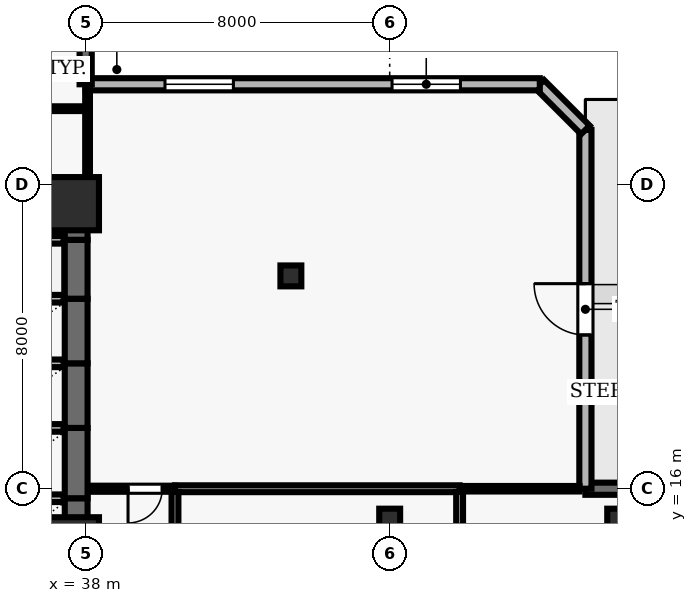
"""IFC4 building model, lengths in metres.
Left out: names, types, materials, properties, quantities, classifications, styles, units other than length and angle.
Written with IfcOpenShell. Run it as: python <this file> out.ifc"""

import sys

from ifc_helpers import new_model, si_unit, direction, frame, frame_2d, origin, origin_2d, place, context, subcontext, project, spatial, rectangle, hollow_rectangle, extrude, element, fill, save


model = new_model("IFC4")
c1 = context("Model", 3, precision=1e-05, world=origin(), true_north=direction((0.0, 1.0)))
c2 = subcontext(c1, "Body", "Model", "MODEL_VIEW")
j1 = project(units=[si_unit("LENGTHUNIT", "METRE"), si_unit("PLANEANGLEUNIT", "RADIAN")], contexts=[c1])
p1 = place(None, origin())
s1 = spatial("IfcSite", under=j1, at=p1, CompositionType="ELEMENT")
p2 = place(p1, origin())
s2 = spatial("IfcBuilding", under=s1, at=p2, CompositionType="ELEMENT")
p3 = place(p2, frame((0.0, 0.0, 62.2)))
s3 = spatial("IfcBuildingStorey", under=s2, at=p3, CompositionType="ELEMENT", Elevation=62.2)
for number, where, z_axis, x_axis in (
    (1, (37.65, 14.55, 0.0), (0.0, 0.0, 1.0), (1.0, 0.0, 0.0)),
    (2, (37.65, 23.5, 0.0), (0.0, 0.0, 1.0), (1.0, 0.0, 0.0)),
):
    element("IfcColumn", number, at=place(p3, frame(where, z_axis=z_axis, x_axis=x_axis)), inside=s3, PredefinedType="COLUMN", context=c2, shape_type="SweptSolid", body=[
        extrude(rectangle(XDim=1.4, YDim=1.4, at=origin_2d()), origin(), (0.0, 0.0, 1.0), 3.9),
    ])
for number, where, z_axis, x_axis in (
    (3, (46.0, 15.2, 0.0), (0.0, 0.0, 1.0), (1.0, 0.0, 0.0)),
    (4, (52.0, 15.2, 0.0), (0.0, 0.0, 1.0), (1.0, 0.0, 0.0)),
    (5, (43.4, 21.6, 0.0), (0.0, 0.0, 1.0), (1.0, 0.0, 0.0)),
):
    element("IfcColumn", number, at=place(p3, frame(where, z_axis=z_axis, x_axis=x_axis)), inside=s3, PredefinedType="COLUMN", context=c2, shape_type="SweptSolid", body=[
        extrude(hollow_rectangle(XDim=0.55, YDim=0.55, WallThickness=0.025, at=origin_2d()), origin(), (0.0, 0.0, 1.0), 3.9),
    ])
p4 = place(p3, frame((73.5, 16.0, 0.0), z_axis=(0.0, 0.0, 1.0), x_axis=(-1.0, 0.0, 0.0)))
e6 = element("IfcWall", 6, at=p4, inside=s3, PredefinedType="SOLIDWALL", context=c2, shape_type="SweptSolid", body=[
    extrude(rectangle(XDim=22.35, YDim=0.32, at=frame_2d((11.175, 0.0))), origin(), (0.0, 0.0, 1.0), 3.69),
])
p5 = place(p4, frame((12.05, 0.0, 0.0)))
e7 = element("IfcOpeningElement", 7, at=p5, cuts=e6, PredefinedType="OPENING", context=c2, shape_type="SweptSolid", body=[
    extrude(rectangle(XDim=1.0, YDim=2.2, at=frame_2d((0.5, 1.1))), frame((0.0, 0.17, 0.0), z_axis=(0.0, -1.0, 0.0), x_axis=(1.0, 0.0, 0.0)), (0.0, 0.0, 1.0), 0.34),
])
p6 = place(p4, frame((1.444, 0.0, 0.9)))
e8 = element("IfcOpeningElement", 8, at=p6, cuts=e6, PredefinedType="OPENING", context=c2, shape_type="SweptSolid", body=[
    extrude(rectangle(XDim=1.8, YDim=1.8, at=frame_2d((0.9, 0.9))), frame((0.0, 0.17, 0.0), z_axis=(0.0, -1.0, 0.0), x_axis=(1.0, 0.0, 0.0)), (0.0, 0.0, 1.0), 0.34),
])
p7 = place(p4, frame((7.481, 0.0, 0.9)))
e9 = element("IfcOpeningElement", 9, at=p7, cuts=e6, PredefinedType="OPENING", context=c2, shape_type="SweptSolid", body=[
    extrude(rectangle(XDim=1.8, YDim=1.8, at=frame_2d((0.9, 0.9))), frame((0.0, 0.17, 0.0), z_axis=(0.0, -1.0, 0.0), x_axis=(1.0, 0.0, 0.0)), (0.0, 0.0, 1.0), 0.34),
])
p8 = place(p4, frame((19.106, 0.0, 0.9)))
e10 = element("IfcOpeningElement", 10, at=p8, cuts=e6, PredefinedType="OPENING", context=c2, shape_type="SweptSolid", body=[
    extrude(rectangle(XDim=1.8, YDim=1.8, at=frame_2d((0.9, 0.9))), frame((0.0, 0.17, 0.0), z_axis=(0.0, -1.0, 0.0), x_axis=(1.0, 0.0, 0.0)), (0.0, 0.0, 1.0), 0.34),
])
p9 = place(p3, frame((51.15, 16.0, 0.0), z_axis=(0.0, 0.0, 1.0), x_axis=(0.0, 1.0, 0.0)))
e11 = element("IfcWall", 11, at=p9, inside=s3, PredefinedType="SOLIDWALL", context=c2, shape_type="SweptSolid", body=[
    extrude(rectangle(XDim=9.442, YDim=0.32, at=frame_2d((4.721, 0.0))), origin(), (0.0, 0.0, 1.0), 3.69),
])
p10 = place(p9, frame((4.046, 0.0, 0.0)))
e12 = element("IfcOpeningElement", 12, at=p10, cuts=e11, PredefinedType="OPENING", context=c2, shape_type="SweptSolid", body=[
    extrude(rectangle(XDim=1.35, YDim=2.2, at=frame_2d((0.675, 1.1))), frame((0.0, 0.17, 0.0), z_axis=(0.0, -1.0, 0.0), x_axis=(1.0, 0.0, 0.0)), (0.0, 0.0, 1.0), 0.34),
])
p11 = place(p3, frame((51.15, 25.442, 0.0), z_axis=(0.0, 0.0, 1.0), x_axis=(-0.707034851297, 0.707178703759, 0.0)))
e13 = element("IfcWall", 13, at=p11, inside=s3, PredefinedType="SOLIDWALL", context=c2, shape_type="SweptSolid", body=[
    extrude(rectangle(XDim=1.697, YDim=0.32, at=frame_2d((0.849, 0.0))), origin(), (0.0, 0.0, 1.0), 3.69),
])
p12 = place(p3, frame((49.95, 26.642, 0.0), z_axis=(0.0, 0.0, 1.0), x_axis=(-1.0, 0.0, 0.0)))
e14 = element("IfcWall", 14, at=p12, inside=s3, PredefinedType="SOLIDWALL", context=c2, shape_type="SweptSolid", body=[
    extrude(rectangle(XDim=11.95, YDim=0.32, at=frame_2d((5.975, 0.0))), origin(), (0.0, 0.0, 1.0), 3.69),
])
p13 = place(p12, frame((2.088, 0.0, 0.9)))
e15 = element("IfcOpeningElement", 15, at=p13, cuts=e14, PredefinedType="OPENING", context=c2, shape_type="SweptSolid", body=[
    extrude(rectangle(XDim=1.8, YDim=2.2, at=frame_2d((0.9, 1.1))), frame((0.0, 0.17, 0.0), z_axis=(0.0, -1.0, 0.0), x_axis=(1.0, 0.0, 0.0)), (0.0, 0.0, 1.0), 0.34),
])
p14 = place(p12, frame((8.063, 0.0, 0.9)))
e16 = element("IfcOpeningElement", 16, at=p14, cuts=e14, PredefinedType="OPENING", context=c2, shape_type="SweptSolid", body=[
    extrude(rectangle(XDim=1.8, YDim=2.2, at=frame_2d((0.9, 1.1))), frame((0.0, 0.17, 0.0), z_axis=(0.0, -1.0, 0.0), x_axis=(1.0, 0.0, 0.0)), (0.0, 0.0, 1.0), 0.34),
])
p15 = place(p3, frame((38.0, 26.642, 0.0), z_axis=(0.0, 0.0, 1.0), x_axis=(0.0, 1.0, 0.0)))
e17 = element("IfcWall", 17, at=p15, inside=s3, PredefinedType="SOLIDWALL", context=c2, shape_type="SweptSolid", body=[
    extrude(rectangle(XDim=24.858, YDim=0.32, at=frame_2d((12.429, 0.0))), origin(), (0.0, 0.0, 1.0), 3.69),
])
p16 = place(p15, frame((11.256, 0.0, 0.0)))
e18 = element("IfcOpeningElement", 18, at=p16, cuts=e17, PredefinedType="OPENING", context=c2, shape_type="SweptSolid", body=[
    extrude(rectangle(XDim=1.0, YDim=2.2, at=frame_2d((0.5, 1.1))), frame((0.0, 0.17, 0.0), z_axis=(0.0, -1.0, 0.0), x_axis=(1.0, 0.0, 0.0)), (0.0, 0.0, 1.0), 0.34),
])
p17 = place(p15, frame((15.236, 0.0, 0.9)))
e19 = element("IfcOpeningElement", 19, at=p17, cuts=e17, PredefinedType="OPENING", context=c2, shape_type="SweptSolid", body=[
    extrude(rectangle(XDim=2.4, YDim=2.2, at=frame_2d((1.2, 1.1))), frame((0.0, 0.17, 0.0), z_axis=(0.0, -1.0, 0.0), x_axis=(1.0, 0.0, 0.0)), (0.0, 0.0, 1.0), 0.34),
])
p18 = place(p15, frame((20.551, 0.0, 0.9)))
e20 = element("IfcOpeningElement", 20, at=p18, cuts=e17, PredefinedType="OPENING", context=c2, shape_type="SweptSolid", body=[
    extrude(rectangle(XDim=2.4, YDim=2.2, at=frame_2d((1.2, 1.1))), frame((0.0, 0.17, 0.0), z_axis=(0.0, -1.0, 0.0), x_axis=(1.0, 0.0, 0.0)), (0.0, 0.0, 1.0), 0.34),
])
p19 = place(p3, frame((37.75, 13.9, 0.0), z_axis=(0.0, 0.0, 1.0), x_axis=(0.0, 1.0, 0.0)))
e21 = element("IfcWall", 21, at=p19, inside=s3, PredefinedType="SHEAR", context=c2, shape_type="SweptSolid", body=[
    extrude(rectangle(XDim=1.85, YDim=0.6, at=frame_2d((0.925, 0.0))), origin(), (0.0, 0.0, 1.0), 3.69),
])
p20 = place(p3, frame((37.42, 15.75, 0.0), z_axis=(0.0, 0.0, 1.0), x_axis=(-1.0, 0.0, 0.0)))
e22 = element("IfcWall", 22, at=p20, inside=s3, PredefinedType="SOLIDWALL", context=c2, shape_type="SweptSolid", body=[
    extrude(rectangle(XDim=2.14, YDim=0.2, at=frame_2d((1.07, 0.0))), origin(), (0.0, 0.0, 1.0), 3.69),
])
p21 = place(p3, frame((37.75, 15.75, 0.0), z_axis=(0.0, 0.0, 1.0), x_axis=(0.0, 1.0, 0.0)))
e23 = element("IfcWall", 23, at=p21, inside=s3, PredefinedType="SHEAR", context=c2, shape_type="SweptSolid", body=[
    extrude(rectangle(XDim=1.85, YDim=0.6, at=frame_2d((0.925, 0.0))), origin(), (0.0, 0.0, 1.0), 3.69),
])
p22 = place(p3, frame((37.42, 17.6, 0.0), z_axis=(0.0, 0.0, 1.0), x_axis=(-1.0, 0.0, 0.0)))
e24 = element("IfcWall", 24, at=p22, inside=s3, PredefinedType="SOLIDWALL", context=c2, shape_type="SweptSolid", body=[
    extrude(rectangle(XDim=2.14, YDim=0.2, at=frame_2d((1.07, 0.0))), origin(), (0.0, 0.0, 1.0), 3.69),
])
p23 = place(p3, frame((37.75, 17.6, 0.0), z_axis=(0.0, 0.0, 1.0), x_axis=(0.0, 1.0, 0.0)))
e25 = element("IfcWall", 25, at=p23, inside=s3, PredefinedType="SHEAR", context=c2, shape_type="SweptSolid", body=[
    extrude(rectangle(XDim=1.7, YDim=0.6, at=frame_2d((0.85, 0.0))), origin(), (0.0, 0.0, 1.0), 3.69),
])
p24 = place(p3, frame((37.42, 19.3, 0.0), z_axis=(0.0, 0.0, 1.0), x_axis=(-1.0, 0.0, 0.0)))
e26 = element("IfcWall", 26, at=p24, inside=s3, PredefinedType="SOLIDWALL", context=c2, shape_type="SweptSolid", body=[
    extrude(rectangle(XDim=2.14, YDim=0.2, at=frame_2d((1.07, 0.0))), origin(), (0.0, 0.0, 1.0), 3.69),
])
p25 = place(p3, frame((37.75, 19.3, 0.0), z_axis=(0.0, 0.0, 1.0), x_axis=(0.0, 1.0, 0.0)))
e27 = element("IfcWall", 27, at=p25, inside=s3, PredefinedType="SHEAR", context=c2, shape_type="SweptSolid", body=[
    extrude(rectangle(XDim=1.7, YDim=0.6, at=frame_2d((0.85, 0.0))), origin(), (0.0, 0.0, 1.0), 3.69),
])
p26 = place(p3, frame((37.42, 21.0, 0.0), z_axis=(0.0, 0.0, 1.0), x_axis=(-1.0, 0.0, 0.0)))
e28 = element("IfcWall", 28, at=p26, inside=s3, PredefinedType="SOLIDWALL", context=c2, shape_type="SweptSolid", body=[
    extrude(rectangle(XDim=2.14, YDim=0.2, at=frame_2d((1.07, 0.0))), origin(), (0.0, 0.0, 1.0), 3.69),
])
p27 = place(p3, frame((37.75, 21.0, 0.0), z_axis=(0.0, 0.0, 1.0), x_axis=(0.0, 1.0, 0.0)))
e29 = element("IfcWall", 29, at=p27, inside=s3, PredefinedType="SHEAR", context=c2, shape_type="SweptSolid", body=[
    extrude(rectangle(XDim=1.55, YDim=0.6, at=frame_2d((0.775, 0.0))), origin(), (0.0, 0.0, 1.0), 3.69),
])
p28 = place(p3, frame((37.42, 22.55, 0.0), z_axis=(0.0, 0.0, 1.0), x_axis=(-1.0, 0.0, 0.0)))
e30 = element("IfcWall", 30, at=p28, inside=s3, PredefinedType="SOLIDWALL", context=c2, shape_type="SweptSolid", body=[
    extrude(rectangle(XDim=2.14, YDim=0.2, at=frame_2d((1.07, 0.0))), origin(), (0.0, 0.0, 1.0), 3.69),
])
p29 = place(p3, frame((37.75, 22.55, 0.0), z_axis=(0.0, 0.0, 1.0), x_axis=(0.0, 1.0, 0.0)))
e31 = element("IfcWall", 31, at=p29, inside=s3, PredefinedType="SHEAR", context=c2, shape_type="SweptSolid", body=[
    extrude(rectangle(XDim=1.5, YDim=0.6, at=frame_2d((0.75, 0.0))), origin(), (0.0, 0.0, 1.0), 3.69),
])
p30 = place(p3, frame((37.42, 24.05, 0.0), z_axis=(0.0, 0.0, 1.0), x_axis=(-1.0, 0.0, 0.0)))
e32 = element("IfcWall", 32, at=p30, inside=s3, PredefinedType="SOLIDWALL", context=c2, shape_type="SweptSolid", body=[
    extrude(rectangle(XDim=2.14, YDim=0.2, at=frame_2d((1.07, 0.0))), origin(), (0.0, 0.0, 1.0), 3.69),
])
p31 = place(p3, frame((35.15, 26.0, 0.0), z_axis=(0.0, 0.0, 1.0), x_axis=(1.0, 0.0, 0.0)))
e33 = element("IfcWall", 33, at=p31, inside=s3, PredefinedType="PARTITIONING", context=c2, shape_type="SweptSolid", body=[
    extrude(rectangle(XDim=2.7, YDim=0.125, at=frame_2d((1.35, 0.0))), origin(), (0.0, 0.0, 1.0), 3.69),
])
p32 = place(p3, frame((40.35, 16.0, 0.0), z_axis=(0.0, 0.0, 1.0), x_axis=(-1.0, 0.0, 0.0)))
e34 = element("IfcWall", 34, at=p32, inside=s3, PredefinedType="PARTITIONING", context=c2, shape_type="SweptSolid", body=[
    extrude(rectangle(XDim=2.27, YDim=0.16, at=frame_2d((1.135, 0.0))), origin(), (0.0, 0.0, 1.0), 3.69),
])
p33 = place(p32, frame((0.335, 0.0, 0.0)))
e35 = element("IfcOpeningElement", 35, at=p33, cuts=e34, PredefinedType="OPENING", context=c2, shape_type="SweptSolid", body=[
    extrude(rectangle(XDim=0.9, YDim=2.1, at=frame_2d((0.45, 1.05))), frame((0.0, 0.09, 0.0), z_axis=(0.0, -1.0, 0.0), x_axis=(1.0, 0.0, 0.0)), (0.0, 0.0, 1.0), 0.18),
])
p34 = place(p3, frame((47.84, 16.0, 0.0), z_axis=(0.0, 0.0, 1.0), x_axis=(1.0, 0.0, 0.0)))
e36 = element("IfcWall", 36, at=p34, inside=s3, PredefinedType="PARTITIONING", context=c2, shape_type="SweptSolid", body=[
    extrude(rectangle(XDim=3.155, YDim=0.145, at=frame_2d((1.578, 0.0))), origin(), (0.0, 0.0, 1.0), 3.69),
])
p35 = place(p3, frame((47.84, 16.0, 0.0), z_axis=(0.0, 0.0, 1.0), x_axis=(-1.0, 0.0, 0.0)))
e37 = element("IfcWall", 37, at=p35, inside=s3, PredefinedType="PARTITIONING", context=c2, shape_type="SweptSolid", body=[
    extrude(rectangle(XDim=7.49, YDim=0.18, at=frame_2d((3.745, 0.0))), origin(), (0.0, 0.0, 1.0), 3.69),
])
p36 = place(p3, frame((38.05, 26.487, 0.0), z_axis=(0.0, 0.0, 1.0), x_axis=(0.0, -1.0, 0.0)))
e38 = element("IfcWall", 38, at=p36, inside=s3, PredefinedType="PARTITIONING", context=c2, shape_type="SweptSolid", body=[
    extrude(rectangle(XDim=2.437, YDim=0.125, at=frame_2d((1.219, 0.0))), origin(), (0.0, 0.0, 1.0), 2.995),
])
p37 = place(p3, frame((40.35, 10.435, 0.0), z_axis=(0.0, 0.0, 1.0), x_axis=(0.0, 1.0, 0.0)))
e39 = element("IfcWall", 39, at=p37, inside=s3, PredefinedType="PARTITIONING", context=c2, shape_type="SweptSolid", body=[
    extrude(rectangle(XDim=5.48, YDim=0.18, at=frame_2d((2.74, 0.0))), origin(), (0.0, 0.0, 1.0), 3.227),
])
p38 = place(p3, frame((47.84, 10.435, 0.0), z_axis=(0.0, 0.0, 1.0), x_axis=(0.0, 1.0, 0.0)))
e40 = element("IfcWall", 40, at=p38, inside=s3, PredefinedType="PARTITIONING", context=c2, shape_type="SweptSolid", body=[
    extrude(rectangle(XDim=5.48, YDim=0.18, at=frame_2d((2.74, 0.0))), origin(), (0.0, 0.0, 1.0), 3.69),
])
p39 = place(p10, origin())
e41 = element("IfcDoor", 41, at=p39, inside=s3, OperationType="SINGLE_SWING_RIGHT", PredefinedType="DOOR", context=c2, shape_type="SweptSolid", body=[
    extrude(rectangle(XDim=1.35, YDim=2.2, at=frame_2d((0.675, 1.1))), frame((0.0, 0.025, 0.0), z_axis=(0.0, -1.0, 0.0), x_axis=(1.0, 0.0, 0.0)), (0.0, 0.0, 1.0), 0.05),
])
fill(e12, e41)
p40 = place(p13, origin())
e42 = element("IfcWindow", 42, at=p40, inside=s3, PartitioningType="SINGLE_PANEL", PredefinedType="WINDOW", context=c2, shape_type="SweptSolid", body=[
    extrude(rectangle(XDim=1.8, YDim=2.2, at=frame_2d((0.9, 1.1))), frame((0.0, 0.03, 0.0), z_axis=(0.0, -1.0, 0.0), x_axis=(1.0, 0.0, 0.0)), (0.0, 0.0, 1.0), 0.06),
])
fill(e15, e42)
p41 = place(p14, origin())
e43 = element("IfcWindow", 43, at=p41, inside=s3, PartitioningType="SINGLE_PANEL", PredefinedType="WINDOW", context=c2, shape_type="SweptSolid", body=[
    extrude(rectangle(XDim=1.8, YDim=2.2, at=frame_2d((0.9, 1.1))), frame((0.0, 0.03, 0.0), z_axis=(0.0, -1.0, 0.0), x_axis=(1.0, 0.0, 0.0)), (0.0, 0.0, 1.0), 0.06),
])
fill(e16, e43)
p42 = place(p33, origin())
e44 = element("IfcDoor", 44, at=p42, inside=s3, OperationType="SINGLE_SWING_RIGHT", PredefinedType="DOOR", context=c2, shape_type="SweptSolid", body=[
    extrude(rectangle(XDim=0.9, YDim=2.1, at=frame_2d((0.45, 1.05))), frame((0.0, 0.025, 0.0), z_axis=(0.0, -1.0, 0.0), x_axis=(1.0, 0.0, 0.0)), (0.0, 0.0, 1.0), 0.05),
])
fill(e35, e44)
save(model, sys.argv[1])
